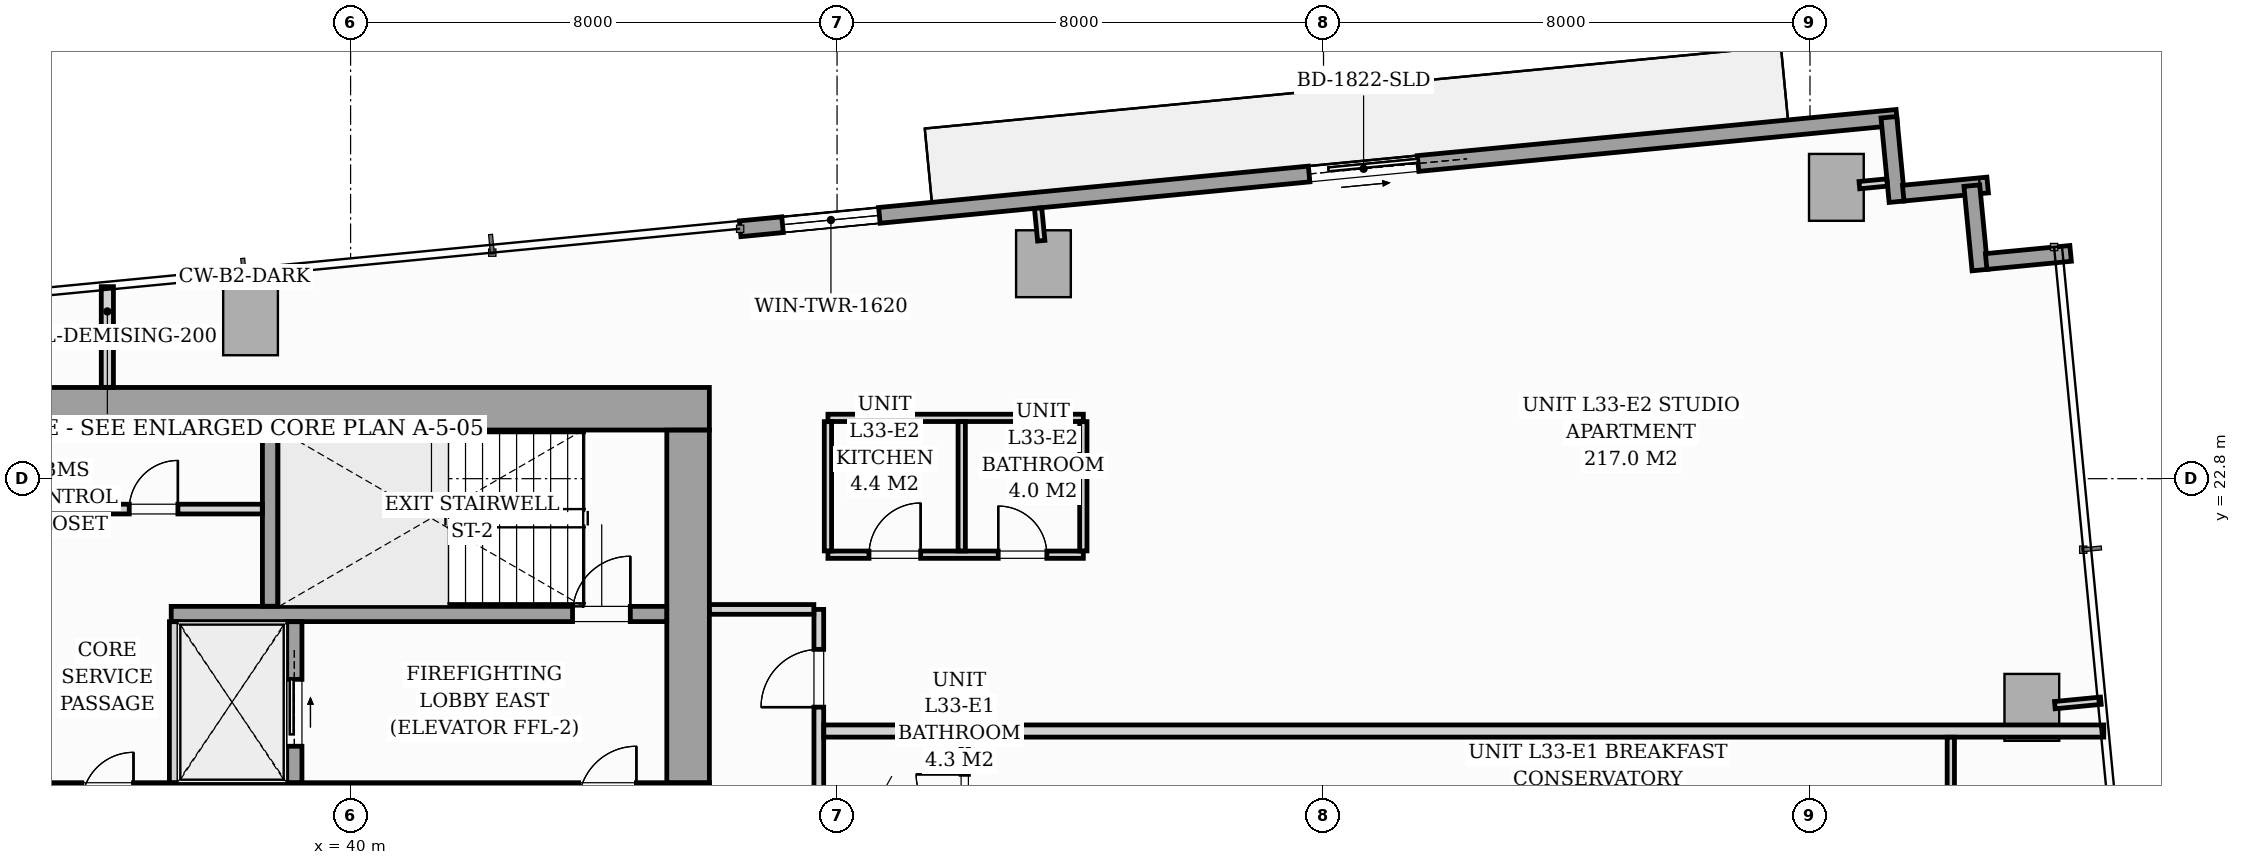
"""IFC4 building model, lengths in metres.
Left out: names, types, materials, properties, quantities, classifications, styles, units other than length and angle.
Written with IfcOpenShell. Run it as: python <this file> out.ifc"""

import sys

from ifc_helpers import new_model, si_unit, direction, frame, frame_2d, origin, origin_2d, place, context, subcontext, project, spatial, rectangle, i_section, extrude, source, transform, mapped, element, fill, save


model = new_model("IFC4")
c1 = context("Model", 3, precision=1e-05, world=origin(), true_north=direction((0.0, 1.0)))
c2 = subcontext(c1, "Body", "Model", "MODEL_VIEW")
j1 = project(units=[si_unit("LENGTHUNIT", "METRE"), si_unit("PLANEANGLEUNIT", "RADIAN")], contexts=[c1])
p1 = place(None, origin())
s1 = spatial("IfcSite", under=j1, at=p1, CompositionType="ELEMENT")
p2 = place(p1, origin())
s2 = spatial("IfcBuilding", under=s1, at=p2, CompositionType="ELEMENT")
p3 = place(p2, frame((0.0, 0.0, 116.2)))
s3 = spatial("IfcBuildingStorey", under=s2, at=p3, CompositionType="ELEMENT", Elevation=116.2)
m1 = source(origin(), c2, "Body", "SweptSolid", [
    extrude(i_section(OverallWidth=0.427, OverallDepth=0.483, WebThickness=0.051, FlangeThickness=0.082, FilletRadius=0.018, at=origin_2d()), origin(), (0.0, 0.0, 1.0), 3.196),
])
for number, where, z_axis, x_axis in (
    (1, (38.88, 24.0, 0.002), (0.0, 0.0, 1.0), (1.0, 0.0, 0.0)),
    (2, (45.6, 24.0, 0.002), (0.0, 0.0, 1.0), (1.0, 0.0, 0.0)),
):
    element("IfcColumn", number, at=place(p3, frame(where, z_axis=z_axis, x_axis=x_axis)), inside=s3, PredefinedType="PILASTER", context=c2, shape_type="MappedRepresentation", body=[
        mapped(m1, transform((0.0, 0.0, 0.0), scale=1.0)),
    ])
m2 = source(origin(), c2, "Body", "SweptSolid", [
    extrude(rectangle(XDim=0.9, YDim=1.1, at=origin_2d()), origin(), (0.0, 0.0, 1.0), 3.194),
])
for number, where, z_axis, x_axis in (
    (3, (38.354, 25.38, 0.002), (0.0, 0.0, 1.0), (0.995, 0.096, 0.0)),
    (4, (51.394, 26.335, 0.002), (0.0, 0.0, 1.0), (0.995, 0.096, 0.0)),
    (5, (64.434, 27.591, 0.002), (0.0, 0.0, 1.0), (0.995, 0.096, 0.0)),
    (6, (67.648, 19.039, 0.002), (0.0, 0.0, 1.0), (0.995, 0.096, 0.0)),
):
    element("IfcColumn", number, at=place(p3, frame(where, z_axis=z_axis, x_axis=x_axis)), inside=s3, PredefinedType="COLUMN", context=c2, shape_type="MappedRepresentation", body=[
        mapped(m2, transform((0.0, 0.0, 0.0), scale=1.0)),
    ])
p4 = place(p3, frame((46.406, 26.91, 0.0), z_axis=(0.0, 0.0, 1.0), x_axis=(0.995396638587, 0.095841180552, 0.0)))
e7 = element("IfcWall", 7, at=p4, inside=s3, PredefinedType="STANDARD", context=c2, shape_type="SweptSolid", body=[
    extrude(rectangle(XDim=19.11, YDim=0.26, at=frame_2d((9.555, 0.0))), origin(), (0.0, 0.0, 1.0), 2.9),
])
p5 = place(p4, frame((9.4, 0.0, 0.0)))
e8 = element("IfcOpeningElement", 8, at=p5, cuts=e7, PredefinedType="OPENING", context=c2, shape_type="SweptSolid", body=[
    extrude(rectangle(XDim=1.8, YDim=2.06, at=frame_2d((0.9, 1.03))), frame((0.0, 0.14, 0.0), z_axis=(0.0, -1.0, 0.0), x_axis=(1.0, 0.0, 0.0)), (0.0, 0.0, 1.0), 0.28),
])
p6 = place(p4, frame((0.7, 0.0, 0.65)))
e9 = element("IfcOpeningElement", 9, at=p6, cuts=e7, PredefinedType="OPENING", context=c2, shape_type="SweptSolid", body=[
    extrude(rectangle(XDim=1.6, YDim=1.5, at=frame_2d((0.8, 0.75))), frame((0.0, 0.14, 0.0), z_axis=(0.0, -1.0, 0.0), x_axis=(1.0, 0.0, 0.0)), (0.0, 0.0, 1.0), 0.28),
])
for number, where, z_axis, x_axis in (
    (10, (65.298, 28.744, 0.0), (0.0, 0.0, 1.0), (0.096, -0.995, 0.0)),
    (11, (65.533, 27.496, 0.0), (0.0, 0.0, 1.0), (0.995, 0.096, 0.0)),
):
    element("IfcWall", number, at=place(p3, frame(where, z_axis=z_axis, x_axis=x_axis)), inside=s3, PredefinedType="STANDARD", context=c2, shape_type="SweptSolid", body=[
        extrude(rectangle(XDim=1.395, YDim=0.26, at=frame_2d((0.698, 0.0))), origin(), (0.0, 0.0, 1.0), 2.9),
    ])
p7 = place(p3, frame((66.662, 27.619, 0.0), z_axis=(0.0, 0.0, 1.0), x_axis=(0.095742423056, -0.99540614245, 0.0)))
e12 = element("IfcWall", 12, at=p7, inside=s3, PredefinedType="STANDARD", context=c2, shape_type="SweptSolid", body=[
    extrude(rectangle(XDim=1.395, YDim=0.26, at=frame_2d((0.697, 0.0))), origin(), (0.0, 0.0, 1.0), 2.9),
])
p8 = place(p3, frame((66.897, 26.371, 0.0), z_axis=(0.0, 0.0, 1.0), x_axis=(0.995391056452, 0.09589913835, 0.0)))
e13 = element("IfcWall", 13, at=p8, inside=s3, PredefinedType="STANDARD", context=c2, shape_type="SweptSolid", body=[
    extrude(rectangle(XDim=1.395, YDim=0.26, at=frame_2d((0.698, 0.0))), origin(), (0.0, 0.0, 1.0), 2.9),
])
p9 = place(p3, frame((26.1, 17.45, 0.0), z_axis=(0.0, 0.0, 1.0), x_axis=(1.0, 0.0, 0.0)))
e14 = element("IfcWall", 14, at=p9, inside=s3, PredefinedType="SHEAR", context=c2, shape_type="SweptSolid", body=[
    extrude(rectangle(XDim=19.8, YDim=0.7, at=frame_2d((9.9, 0.0))), origin(), (0.0, 0.0, 1.0), 3.2),
])
p10 = place(p9, frame((1.05, 0.0, 0.0)))
e15 = element("IfcOpeningElement", 15, at=p10, cuts=e14, PredefinedType="OPENING", context=c2, shape_type="SweptSolid", body=[
    extrude(rectangle(XDim=0.95, YDim=2.06, at=frame_2d((0.475, 1.03))), frame((0.0, 0.36, 0.0), z_axis=(0.0, -1.0, 0.0), x_axis=(1.0, 0.0, 0.0)), (0.0, 0.0, 1.0), 0.72),
])
p11 = place(p9, frame((9.48, 0.0, 0.0)))
e16 = element("IfcOpeningElement", 16, at=p11, cuts=e14, PredefinedType="OPENING", context=c2, shape_type="SweptSolid", body=[
    extrude(rectangle(XDim=0.85, YDim=2.0, at=frame_2d((0.425, 1.0))), frame((0.0, 0.36, 0.0), z_axis=(0.0, -1.0, 0.0), x_axis=(1.0, 0.0, 0.0)), (0.0, 0.0, 1.0), 0.72),
])
p12 = place(p9, frame((17.65, 0.0, 0.0)))
e17 = element("IfcOpeningElement", 17, at=p12, cuts=e14, PredefinedType="OPENING", context=c2, shape_type="SweptSolid", body=[
    extrude(rectangle(XDim=0.95, YDim=2.06, at=frame_2d((0.475, 1.03))), frame((0.0, 0.36, 0.0), z_axis=(0.0, -1.0, 0.0), x_axis=(1.0, 0.0, 0.0)), (0.0, 0.0, 1.0), 0.72),
])
p13 = place(p3, frame((26.1, 23.95, 0.0), z_axis=(0.0, 0.0, 1.0), x_axis=(1.0, 0.0, 0.0)))
e18 = element("IfcWall", 18, at=p13, inside=s3, PredefinedType="SHEAR", context=c2, shape_type="SweptSolid", body=[
    extrude(rectangle(XDim=19.8, YDim=0.7, at=frame_2d((9.9, 0.0))), origin(), (0.0, 0.0, 1.0), 3.2),
])
p14 = place(p3, frame((45.55, 17.802, 0.0), z_axis=(0.0, 0.0, 1.0), x_axis=(0.0, 1.0, 0.0)))
e19 = element("IfcWall", 19, at=p14, inside=s3, PredefinedType="SHEAR", context=c2, shape_type="SweptSolid", body=[
    extrude(rectangle(XDim=5.796, YDim=0.7, at=frame_2d((2.898, 0.0))), origin(), (0.0, 0.0, 1.0), 3.2),
])
p15 = place(p3, frame((37.05, 20.575, 0.0), z_axis=(0.0, 0.0, 1.0), x_axis=(1.0, 0.0, 0.0)))
e20 = element("IfcWall", 20, at=p15, inside=s3, PredefinedType="SOLIDWALL", context=c2, shape_type="SweptSolid", body=[
    extrude(rectangle(XDim=8.148, YDim=0.25, at=frame_2d((4.074, 0.0))), origin(), (0.0, 0.0, 1.0), 3.2),
])
p16 = place(p15, frame((6.6, 0.0, 0.0)))
e21 = element("IfcOpeningElement", 21, at=p16, cuts=e20, PredefinedType="OPENING", context=c2, shape_type="SweptSolid", body=[
    extrude(rectangle(XDim=0.95, YDim=2.06, at=frame_2d((0.475, 1.03))), frame((0.0, 0.135, 0.0), z_axis=(0.0, -1.0, 0.0), x_axis=(1.0, 0.0, 0.0)), (0.0, 0.0, 1.0), 0.27),
])
p17 = place(p3, frame((38.675, 20.702, 0.0), z_axis=(0.0, 0.0, 1.0), x_axis=(0.0, 1.0, 0.0)))
e22 = element("IfcWall", 22, at=p17, inside=s3, PredefinedType="SOLIDWALL", context=c2, shape_type="SweptSolid", body=[
    extrude(rectangle(XDim=2.896, YDim=0.25, at=frame_2d((1.448, 0.0))), origin(), (0.0, 0.0, 1.0), 3.2),
])
p18 = place(p3, frame((37.1, 17.802, 0.0), z_axis=(0.0, 0.0, 1.0), x_axis=(0.0, 1.0, 0.0)))
e23 = element("IfcWall", 23, at=p18, inside=s3, PredefinedType="PARTITIONING", context=c2, shape_type="SweptSolid", body=[
    extrude(rectangle(XDim=2.646, YDim=0.16, at=frame_2d((1.323, 0.0))), origin(), (0.0, 0.0, 1.0), 2.9),
])
p19 = place(p3, frame((39.075, 17.802, 0.0), z_axis=(0.0, 0.0, 1.0), x_axis=(0.0, 1.0, 0.0)))
e24 = element("IfcWall", 24, at=p19, inside=s3, PredefinedType="SOLIDWALL", context=c2, shape_type="SweptSolid", body=[
    extrude(rectangle(XDim=2.646, YDim=0.25, at=frame_2d((1.323, 0.0))), origin(), (0.0, 0.0, 1.0), 3.2),
])
p20 = place(p19, frame((0.598, 0.0, 0.0)))
e25 = element("IfcOpeningElement", 25, at=p20, cuts=e24, PredefinedType="OPENING", context=c2, shape_type="SweptSolid", body=[
    extrude(rectangle(XDim=1.1, YDim=2.08, at=frame_2d((0.55, 1.04))), frame((0.0, 0.135, 0.0), z_axis=(0.0, -1.0, 0.0), x_axis=(1.0, 0.0, 0.0)), (0.0, 0.0, 1.0), 0.27),
])
p21 = place(p3, frame((34.982, 22.3, 0.0), z_axis=(0.0, 0.0, 1.0), x_axis=(1.0, 0.0, 0.0)))
e26 = element("IfcWall", 26, at=p21, inside=s3, PredefinedType="PARTITIONING", context=c2, shape_type="SweptSolid", body=[
    extrude(rectangle(XDim=3.566, YDim=0.16, at=frame_2d((1.783, 0.0))), origin(), (0.0, 0.0, 1.0), 2.9),
])
p22 = place(p21, frame((1.378, 0.0, 0.0)))
e27 = element("IfcOpeningElement", 27, at=p22, cuts=e26, PredefinedType="OPENING", context=c2, shape_type="SweptSolid", body=[
    extrude(rectangle(XDim=0.8, YDim=2.05, at=frame_2d((0.4, 1.025))), frame((0.0, 0.09, 0.0), z_axis=(0.0, -1.0, 0.0), x_axis=(1.0, 0.0, 0.0)), (0.0, 0.0, 1.0), 0.18),
])
p23 = place(p3, frame((47.7, 12.732, 0.0), z_axis=(0.0, 0.0, 1.0), x_axis=(0.0, 1.0, 0.0)))
e28 = element("IfcWall", 28, at=p23, inside=s3, PredefinedType="PARTITIONING", context=c2, shape_type="SweptSolid", body=[
    extrude(rectangle(XDim=7.918, YDim=0.16, at=frame_2d((3.959, 0.0))), origin(), (0.0, 0.0, 1.0), 2.9),
])
p24 = place(p23, frame((0.493, 0.0, 0.0)))
e29 = element("IfcOpeningElement", 29, at=p24, cuts=e28, PredefinedType="OPENING", context=c2, shape_type="SweptSolid", body=[
    extrude(rectangle(XDim=0.85, YDim=2.0, at=frame_2d((0.425, 1.0))), frame((0.0, 0.09, 0.0), z_axis=(0.0, -1.0, 0.0), x_axis=(1.0, 0.0, 0.0)), (0.0, 0.0, 1.0), 0.18),
])
p25 = place(p23, frame((6.311, 0.0, 0.0)))
e30 = element("IfcOpeningElement", 30, at=p25, cuts=e28, PredefinedType="OPENING", context=c2, shape_type="SweptSolid", body=[
    extrude(rectangle(XDim=0.95, YDim=2.06, at=frame_2d((0.475, 1.03))), frame((0.0, 0.09, 0.0), z_axis=(0.0, -1.0, 0.0), x_axis=(1.0, 0.0, 0.0)), (0.0, 0.0, 1.0), 0.18),
])
p26 = place(p3, frame((36.0, 24.302, 0.0), z_axis=(0.0, 0.0, 1.0), x_axis=(0.0, 1.0, 0.0)))
e31 = element("IfcWall", 31, at=p26, inside=s3, PredefinedType="PARTITIONING", context=c2, shape_type="SweptSolid", body=[
    extrude(rectangle(XDim=1.656, YDim=0.2, at=frame_2d((0.828, 0.0))), origin(), (0.0, 0.0, 1.0), 2.9),
])
p27 = place(p3, frame((45.902, 20.65, 0.0), z_axis=(0.0, 0.0, 1.0), x_axis=(1.0, 0.0, 0.0)))
e32 = element("IfcWall", 32, at=p27, inside=s3, PredefinedType="PARTITIONING", context=c2, shape_type="SweptSolid", body=[
    extrude(rectangle(XDim=1.716, YDim=0.16, at=frame_2d((0.858, 0.0))), origin(), (0.0, 0.0, 1.0), 2.9),
])
p28 = place(p3, frame((47.782, 18.65, 0.0), z_axis=(0.0, 0.0, 1.0), x_axis=(1.0, 0.0, 0.0)))
e33 = element("IfcWall", 33, at=p28, inside=s3, PredefinedType="PARTITIONING", context=c2, shape_type="SweptSolid", body=[
    extrude(rectangle(XDim=21.049, YDim=0.2, at=frame_2d((10.525, 0.0))), origin(), (0.0, 0.0, 1.0), 2.023),
])
p29 = place(p3, frame((50.1, 14.5, 0.0), z_axis=(0.0, 0.0, 1.0), x_axis=(0.0, 1.0, 0.0)))
e34 = element("IfcWall", 34, at=p29, inside=s3, PredefinedType="PARTITIONING", context=c2, shape_type="SweptSolid", body=[
    extrude(rectangle(XDim=4.048, YDim=0.12, at=frame_2d((2.024, 0.0))), origin(), (0.0, 0.0, 1.0), 2.9),
])
p30 = place(p29, frame((0.587, 0.0, 0.0)))
e35 = element("IfcOpeningElement", 35, at=p30, cuts=e34, PredefinedType="OPENING", context=c2, shape_type="SweptSolid", body=[
    extrude(rectangle(XDim=0.85, YDim=2.05, at=frame_2d((0.425, 1.025))), frame((0.0, 0.07, 0.0), z_axis=(0.0, -1.0, 0.0), x_axis=(1.0, 0.0, 0.0)), (0.0, 0.0, 1.0), 0.14),
])
p31 = place(p29, frame((2.638, 0.0, 0.0)))
e36 = element("IfcOpeningElement", 36, at=p31, cuts=e34, PredefinedType="OPENING", context=c2, shape_type="SweptSolid", body=[
    extrude(rectangle(XDim=0.8, YDim=2.0, at=frame_2d((0.4, 1.0))), frame((0.0, 0.07, 0.0), z_axis=(0.0, -1.0, 0.0), x_axis=(1.0, 0.0, 0.0)), (0.0, 0.0, 1.0), 0.14),
])
p32 = place(p3, frame((66.316, 9.128, 0.0), z_axis=(0.0, 0.0, 1.0), x_axis=(0.0, 1.0, 0.0)))
e37 = element("IfcWall", 37, at=p32, inside=s3, PredefinedType="PARTITIONING", context=c2, shape_type="SweptSolid", body=[
    extrude(rectangle(XDim=9.42, YDim=0.12, at=frame_2d((4.71, 0.0))), origin(), (0.0, 0.0, 1.0), 2.27),
])
p33 = place(p32, frame((4.798, 0.0, 0.0)))
e38 = element("IfcOpeningElement", 38, at=p33, cuts=e37, PredefinedType="OPENING", context=c2, shape_type="SweptSolid", body=[
    extrude(rectangle(XDim=0.85, YDim=2.05, at=frame_2d((0.425, 1.025))), frame((0.0, 0.07, 0.0), z_axis=(0.0, -1.0, 0.0), x_axis=(1.0, 0.0, 0.0)), (0.0, 0.0, 1.0), 0.14),
])
p34 = place(p3, frame((47.85, 21.55, 0.0), z_axis=(0.0, 0.0, 1.0), x_axis=(1.0, 0.0, 0.0)))
e39 = element("IfcWall", 39, at=p34, inside=s3, PredefinedType="PARTITIONING", context=c2, shape_type="SweptSolid", body=[
    extrude(rectangle(XDim=4.2, YDim=0.12, at=frame_2d((2.1, 0.0))), origin(), (0.0, 0.0, 1.0), 2.9),
])
p35 = place(p34, frame((0.675, 0.0, 0.0)))
e40 = element("IfcOpeningElement", 40, at=p35, cuts=e39, PredefinedType="OPENING", context=c2, shape_type="SweptSolid", body=[
    extrude(rectangle(XDim=0.85, YDim=2.05, at=frame_2d((0.425, 1.025))), frame((0.0, 0.07, 0.0), z_axis=(0.0, -1.0, 0.0), x_axis=(1.0, 0.0, 0.0)), (0.0, 0.0, 1.0), 0.14),
])
p36 = place(p34, frame((2.8, 0.0, 0.0)))
e41 = element("IfcOpeningElement", 41, at=p36, cuts=e39, PredefinedType="OPENING", context=c2, shape_type="SweptSolid", body=[
    extrude(rectangle(XDim=0.8, YDim=2.02, at=frame_2d((0.4, 1.01))), frame((0.0, 0.07, 0.0), z_axis=(0.0, -1.0, 0.0), x_axis=(1.0, 0.0, 0.0)), (0.0, 0.0, 1.0), 0.14),
])
p37 = place(p3, frame((47.85, 23.8, 0.0), z_axis=(0.0, 0.0, 1.0), x_axis=(1.0, 0.0, 0.0)))
e42 = element("IfcWall", 42, at=p37, inside=s3, PredefinedType="PARTITIONING", context=c2, shape_type="SweptSolid", body=[
    extrude(rectangle(XDim=4.2, YDim=0.12, at=frame_2d((2.1, 0.0))), origin(), (0.0, 0.0, 1.0), 2.9),
])
for number, where, z_axis, x_axis in (
    (43, (47.85, 21.612, 0.0), (0.0, 0.0, 1.0), (0.0, 1.0, 0.0)),
    (44, (50.05, 21.612, 0.0), (0.0, 0.0, 1.0), (0.0, 1.0, 0.0)),
    (45, (52.05, 21.612, 0.0), (0.0, 0.0, 1.0), (0.0, 1.0, 0.0)),
):
    element("IfcWall", number, at=place(p3, frame(where, z_axis=z_axis, x_axis=x_axis)), inside=s3, PredefinedType="PARTITIONING", context=c2, shape_type="SweptSolid", body=[
        extrude(rectangle(XDim=2.126, YDim=0.12, at=frame_2d((1.063, 0.0))), origin(), (0.0, 0.0, 1.0), 2.9),
    ])
p38 = place(p3, frame((51.358, 26.713, 0.0), z_axis=(0.0, 0.0, 1.0), x_axis=(-0.095772948675, 0.995403205893, 0.0)))
e46 = element("IfcWall", 46, at=p38, inside=s3, PredefinedType="PARTITIONING", context=c2, shape_type="SweptSolid", body=[
    extrude(rectangle(XDim=0.538, YDim=0.12, at=frame_2d((0.269, 0.0))), origin(), (0.0, 0.0, 1.0), 2.9),
])
p39 = place(p3, frame((64.812, 27.627, 0.0), z_axis=(0.0, 0.0, 1.0), x_axis=(0.995389482415, 0.095915474751, 0.0)))
e47 = element("IfcWall", 47, at=p39, inside=s3, PredefinedType="PARTITIONING", context=c2, shape_type="SweptSolid", body=[
    extrude(rectangle(XDim=0.458, YDim=0.12, at=frame_2d((0.229, 0.0))), origin(), (0.0, 0.0, 1.0), 2.9),
])
p40 = place(p3, frame((68.027, 19.076, 0.0), z_axis=(0.0, 0.0, 1.0), x_axis=(0.995377786728, 0.096036772582, 0.0)))
e48 = element("IfcWall", 48, at=p40, inside=s3, PredefinedType="PARTITIONING", context=c2, shape_type="SweptSolid", body=[
    extrude(rectangle(XDim=0.76, YDim=0.12, at=frame_2d((0.38, 0.0))), origin(), (0.0, 0.0, 1.0), 2.9),
])
m3 = source(origin(), c2, "Body", "SweptSolid", [
    extrude(rectangle(XDim=1.8, YDim=2.06, at=frame_2d((0.9, 1.03))), frame((0.0, 0.025, 0.0), z_axis=(0.0, -1.0, 0.0), x_axis=(1.0, 0.0, 0.0)), (0.0, 0.0, 1.0), 0.05),
])
p41 = place(p5, origin())
e49 = element("IfcDoor", 49, at=p41, inside=s3, OperationType="SLIDING_TO_RIGHT", PredefinedType="DOOR", context=c2, shape_type="MappedRepresentation", body=[
    mapped(m3, transform((0.0, 0.0, 0.0), scale=1.0)),
])
fill(e8, e49)
m4 = source(origin(), c2, "Body", "SweptSolid", [
    extrude(rectangle(XDim=1.6, YDim=1.5, at=frame_2d((0.8, 0.75))), frame((0.0, 0.03, 0.0), z_axis=(0.0, -1.0, 0.0), x_axis=(1.0, 0.0, 0.0)), (0.0, 0.0, 1.0), 0.06),
])
p42 = place(p6, origin())
e50 = element("IfcWindow", 50, at=p42, inside=s3, PartitioningType="SINGLE_PANEL", PredefinedType="WINDOW", context=c2, shape_type="MappedRepresentation", body=[
    mapped(m4, transform((0.0, 0.0, 0.0), scale=1.0)),
])
fill(e9, e50)
m5 = source(origin(), c2, "Body", "SweptSolid", [
    extrude(rectangle(XDim=0.95, YDim=2.06, at=frame_2d((0.475, 1.03))), frame((0.0, 0.025, 0.0), z_axis=(0.0, -1.0, 0.0), x_axis=(1.0, 0.0, 0.0)), (0.0, 0.0, 1.0), 0.05),
])
p43 = place(p16, origin())
e51 = element("IfcDoor", 51, at=p43, inside=s3, OperationType="SINGLE_SWING_RIGHT", PredefinedType="DOOR", context=c2, shape_type="MappedRepresentation", body=[
    mapped(m5, transform((0.0, 0.0, 0.0), scale=1.0)),
])
fill(e21, e51)
m6 = source(origin(), c2, "Body", "SweptSolid", [
    extrude(rectangle(XDim=1.1, YDim=2.08, at=frame_2d((0.55, 1.04))), frame((0.0, 0.025, 0.0), z_axis=(0.0, -1.0, 0.0), x_axis=(1.0, 0.0, 0.0)), (0.0, 0.0, 1.0), 0.05),
])
p44 = place(p20, origin())
e52 = element("IfcDoor", 52, at=p44, inside=s3, OperationType="SLIDING_TO_RIGHT", PredefinedType="DOOR", context=c2, shape_type="MappedRepresentation", body=[
    mapped(m6, transform((0.0, 0.0, 0.0), scale=1.0)),
])
fill(e25, e52)
m7 = source(origin(), c2, "Body", "SweptSolid", [
    extrude(rectangle(XDim=0.8, YDim=2.05, at=frame_2d((0.4, 1.025))), frame((0.0, 0.025, 0.0), z_axis=(0.0, -1.0, 0.0), x_axis=(1.0, 0.0, 0.0)), (0.0, 0.0, 1.0), 0.05),
])
p45 = place(p22, origin())
e53 = element("IfcDoor", 53, at=p45, inside=s3, OperationType="SINGLE_SWING_RIGHT", PredefinedType="DOOR", context=c2, shape_type="MappedRepresentation", body=[
    mapped(m7, transform((0.0, 0.0, 0.0), scale=1.0)),
])
fill(e27, e53)
m8 = source(origin(), c2, "Body", "SweptSolid", [
    extrude(rectangle(XDim=0.8, YDim=2.0, at=frame_2d((0.4, 1.0))), frame((0.0, 0.025, 0.0), z_axis=(0.0, -1.0, 0.0), x_axis=(1.0, 0.0, 0.0)), (0.0, 0.0, 1.0), 0.05),
])
p46 = place(p31, origin())
e54 = element("IfcDoor", 54, at=p46, inside=s3, OperationType="SINGLE_SWING_RIGHT", PredefinedType="DOOR", context=c2, shape_type="MappedRepresentation", body=[
    mapped(m8, transform((0.0, 0.0, 0.0), scale=1.0)),
])
fill(e36, e54)
m9 = source(origin(), c2, "Body", "SweptSolid", [
    extrude(rectangle(XDim=0.95, YDim=2.06, at=frame_2d((0.475, 1.03))), frame((0.0, 0.025, 0.0), z_axis=(0.0, -1.0, 0.0), x_axis=(1.0, 0.0, 0.0)), (0.0, 0.0, 1.0), 0.05),
])
p47 = place(p25, origin())
e55 = element("IfcDoor", 55, at=p47, inside=s3, OperationType="SINGLE_SWING_LEFT", PredefinedType="DOOR", context=c2, shape_type="MappedRepresentation", body=[
    mapped(m9, transform((0.0, 0.0, 0.0), scale=1.0)),
])
fill(e30, e55)
m10 = source(origin(), c2, "Body", "SweptSolid", [
    extrude(rectangle(XDim=0.85, YDim=2.05, at=frame_2d((0.425, 1.025))), frame((0.0, 0.025, 0.0), z_axis=(0.0, -1.0, 0.0), x_axis=(1.0, 0.0, 0.0)), (0.0, 0.0, 1.0), 0.05),
])
p48 = place(p35, origin())
e56 = element("IfcDoor", 56, at=p48, inside=s3, OperationType="SINGLE_SWING_RIGHT", PredefinedType="DOOR", context=c2, shape_type="MappedRepresentation", body=[
    mapped(m10, transform((0.0, 0.0, 0.0), scale=1.0)),
])
fill(e40, e56)
m11 = source(origin(), c2, "Body", "SweptSolid", [
    extrude(rectangle(XDim=0.8, YDim=2.02, at=frame_2d((0.4, 1.01))), frame((0.0, 0.025, 0.0), z_axis=(0.0, -1.0, 0.0), x_axis=(1.0, 0.0, 0.0)), (0.0, 0.0, 1.0), 0.05),
])
p49 = place(p36, origin())
e57 = element("IfcDoor", 57, at=p49, inside=s3, OperationType="SINGLE_SWING_LEFT", PredefinedType="DOOR", context=c2, shape_type="MappedRepresentation", body=[
    mapped(m11, transform((0.0, 0.0, 0.0), scale=1.0)),
])
fill(e41, e57)
save(model, sys.argv[1])
